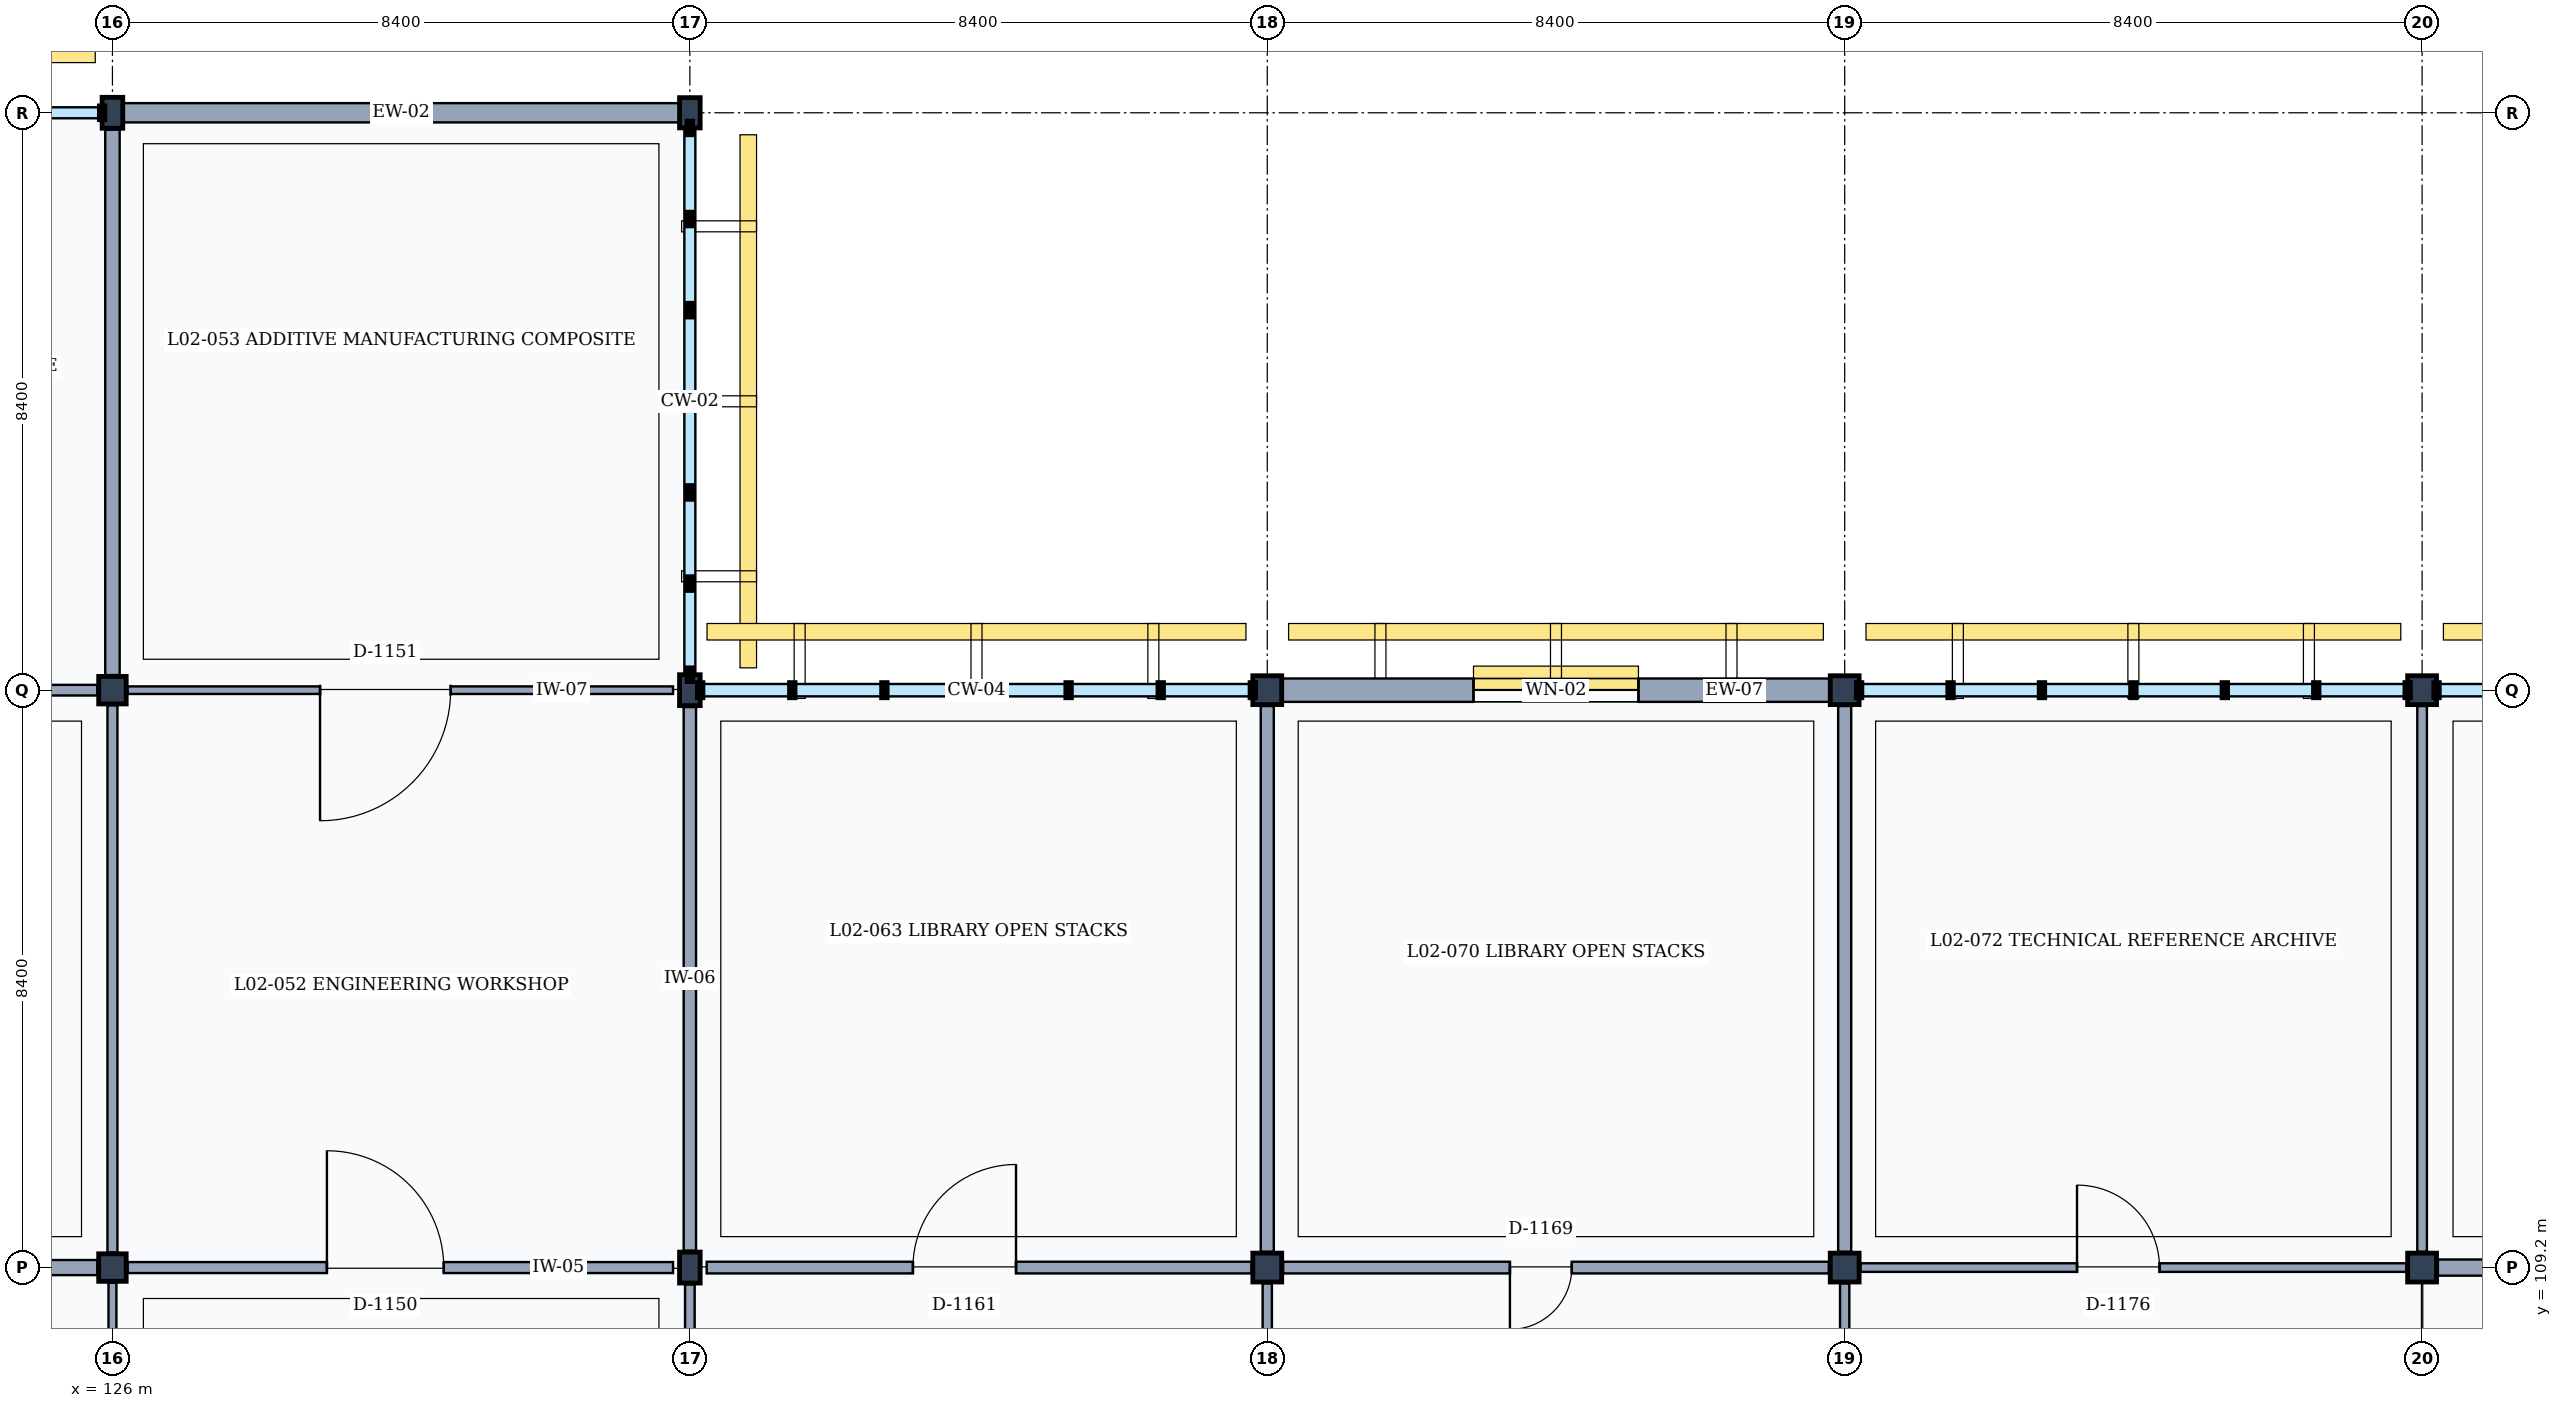
"""IFC4 building model, lengths in metres.
Left out: names, types, materials, properties, quantities, classifications, styles, units other than length and angle.
Written with IfcOpenShell. Run it as: python <this file> out.ifc"""

import sys

from ifc_helpers import new_model, si_unit, direction, frame, frame_2d, origin, origin_2d, place, context, subcontext, project, spatial, rectangle, i_section, extrude, element, fill, save


model = new_model("IFC4")
c1 = context("Model", 3, precision=1e-05, world=origin(), true_north=direction((0.0, 1.0)))
c2 = subcontext(c1, "Body", "Model", "MODEL_VIEW")
j1 = project(units=[si_unit("LENGTHUNIT", "METRE"), si_unit("PLANEANGLEUNIT", "RADIAN")], contexts=[c1])
p1 = place(None, origin())
s1 = spatial("IfcSite", under=j1, at=p1, CompositionType="ELEMENT")
p2 = place(p1, origin())
s2 = spatial("IfcBuilding", under=s1, at=p2, CompositionType="ELEMENT")
p3 = place(p2, frame((0.0, 0.0, 9.6)))
s3 = spatial("IfcBuildingStorey", under=s2, at=p3, CompositionType="ELEMENT", Elevation=9.6)
for number, where, z_axis, x_axis in (
    (1, (126.0, 109.2, 0.0), (0.0, 0.0, 1.0), (1.0, 0.0, 0.0)),
    (2, (126.0, 117.6, 0.0), (0.0, 0.0, 1.0), (1.0, 0.0, 0.0)),
):
    element("IfcColumn", number, at=place(p3, frame(where, z_axis=z_axis, x_axis=x_axis)), inside=s3, PredefinedType="COLUMN", context=c2, shape_type="SweptSolid", body=[
        extrude(rectangle(XDim=0.4, YDim=0.4, at=origin_2d()), origin(), (0.0, 0.0, 1.0), 4.2),
    ])
for number, where, z_axis, x_axis in (
    (3, (126.0, 126.0, 0.0), (0.0, 0.0, 1.0), (1.0, 0.0, 0.0)),
    (4, (134.4, 109.2, 0.0), (0.0, 0.0, 1.0), (1.0, 0.0, 0.0)),
    (5, (134.4, 117.6, 0.0), (0.0, 0.0, 1.0), (1.0, 0.0, 0.0)),
):
    element("IfcColumn", number, at=place(p3, frame(where, z_axis=z_axis, x_axis=x_axis)), inside=s3, PredefinedType="COLUMN", context=c2, shape_type="SweptSolid", body=[
        extrude(i_section(OverallWidth=0.3, OverallDepth=0.45, WebThickness=0.014, FlangeThickness=0.026, FilletRadius=0.027, at=origin_2d()), origin(), (0.0, 0.0, 1.0), 4.2),
    ])
p4 = place(p3, frame((134.4, 126.0, 0.0), z_axis=(0.0, 0.0, 1.0), x_axis=(1.0, 0.0, 0.0)))
e6 = element("IfcColumn", 6, at=p4, inside=s3, PredefinedType="COLUMN", context=c2, shape_type="SweptSolid", body=[
    extrude(i_section(OverallWidth=0.3, OverallDepth=0.44, WebThickness=0.011, FlangeThickness=0.021, FilletRadius=0.027, at=origin_2d()), origin(), (0.0, 0.0, 1.0), 4.2),
])
for number, where, z_axis, x_axis in (
    (7, (142.8, 109.2, 0.0), (0.0, 0.0, 1.0), (1.0, 0.0, 0.0)),
    (8, (142.8, 117.6, 0.0), (0.0, 0.0, 1.0), (1.0, 0.0, 0.0)),
    (9, (151.2, 109.2, 0.0), (0.0, 0.0, 1.0), (1.0, 0.0, 0.0)),
    (10, (151.2, 117.6, 0.0), (0.0, 0.0, 1.0), (1.0, 0.0, 0.0)),
    (11, (159.6, 109.2, 0.0), (0.0, 0.0, 1.0), (1.0, 0.0, 0.0)),
    (12, (159.6, 117.6, 0.0), (0.0, 0.0, 1.0), (1.0, 0.0, 0.0)),
):
    element("IfcColumn", number, at=place(p3, frame(where, z_axis=z_axis, x_axis=x_axis)), inside=s3, PredefinedType="COLUMN", context=c2, shape_type="SweptSolid", body=[
        extrude(rectangle(XDim=0.42, YDim=0.42, at=origin_2d()), origin(), (0.0, 0.0, 1.0), 4.2),
    ])
p5 = place(p3, frame((126.15, 126.0, 0.0), z_axis=(0.0, 0.0, 1.0), x_axis=(1.0, 0.0, 0.0)))
e13 = element("IfcWall", 13, at=p5, inside=s3, PredefinedType="SOLIDWALL", context=c2, shape_type="SweptSolid", body=[
    extrude(rectangle(XDim=8.1, YDim=0.28, at=frame_2d((4.05, 0.0))), origin(), (0.0, 0.0, 1.0), 3.36),
])
p6 = place(p3, frame((143.01, 117.6, 0.0), z_axis=(0.0, 0.0, 1.0), x_axis=(1.0, 0.0, 0.0)))
e14 = element("IfcWall", 14, at=p6, inside=s3, PredefinedType="SOLIDWALL", context=c2, shape_type="SweptSolid", body=[
    extrude(rectangle(XDim=7.98, YDim=0.34, at=frame_2d((3.99, 0.0))), origin(), (0.0, 0.0, 1.0), 3.36),
])
p7 = place(p6, frame((2.79, 0.0, 0.9)))
e15 = element("IfcOpeningElement", 15, at=p7, cuts=e14, PredefinedType="OPENING", context=c2, shape_type="SweptSolid", body=[
    extrude(rectangle(XDim=2.4, YDim=1.8, at=frame_2d((1.2, 0.9))), frame((0.0, 0.18, 0.0), z_axis=(0.0, -1.0, 0.0), x_axis=(1.0, 0.0, 0.0)), (0.0, 0.0, 1.0), 0.36),
])
p8 = place(p3, frame((126.0, 101.02, 0.0), z_axis=(0.0, 0.0, 1.0), x_axis=(0.0, 1.0, 0.0)))
e16 = element("IfcWall", 16, at=p8, inside=s3, PredefinedType="PARTITIONING", context=c2, shape_type="SweptSolid", body=[
    extrude(rectangle(XDim=7.96, YDim=0.115, at=frame_2d((3.98, 0.0))), origin(), (0.0, 0.0, 1.0), 3.32),
])
p9 = place(p3, frame((117.745, 109.2, 0.0), z_axis=(0.0, 0.0, 1.0), x_axis=(1.0, 0.0, 0.0)))
e17 = element("IfcWall", 17, at=p9, inside=s3, PredefinedType="PARTITIONING", context=c2, shape_type="SweptSolid", body=[
    extrude(rectangle(XDim=8.035, YDim=0.22, at=frame_2d((4.018, 0.0))), origin(), (0.0, 0.0, 1.0), 3.32),
])
p10 = place(p9, frame((3.225, 0.0, 0.0)))
e18 = element("IfcOpeningElement", 18, at=p10, cuts=e17, PredefinedType="OPENING", context=c2, shape_type="SweptSolid", body=[
    extrude(rectangle(XDim=1.05, YDim=2.2, at=frame_2d((0.525, 1.1))), frame((0.0, 0.12, 0.0), z_axis=(0.0, -1.0, 0.0), x_axis=(1.0, 0.0, 0.0)), (0.0, 0.0, 1.0), 0.24),
])
p11 = place(p3, frame((126.0, 109.42, 0.0), z_axis=(0.0, 0.0, 1.0), x_axis=(0.0, 1.0, 0.0)))
e19 = element("IfcWall", 19, at=p11, inside=s3, PredefinedType="PARTITIONING", context=c2, shape_type="SweptSolid", body=[
    extrude(rectangle(XDim=7.96, YDim=0.145, at=frame_2d((3.98, 0.0))), origin(), (0.0, 0.0, 1.0), 3.32),
])
p12 = place(p3, frame((117.8, 117.6, 0.0), z_axis=(0.0, 0.0, 1.0), x_axis=(1.0, 0.0, 0.0)))
e20 = element("IfcWall", 20, at=p12, inside=s3, PredefinedType="PARTITIONING", context=c2, shape_type="SweptSolid", body=[
    extrude(rectangle(XDim=7.98, YDim=0.155, at=frame_2d((3.99, 0.0))), origin(), (0.0, 0.0, 1.0), 3.32),
])
p13 = place(p12, frame((3.175, 0.0, 0.0)))
e21 = element("IfcOpeningElement", 21, at=p13, cuts=e20, PredefinedType="OPENING", context=c2, shape_type="SweptSolid", body=[
    extrude(rectangle(XDim=1.15, YDim=2.25, at=frame_2d((0.575, 1.125))), frame((0.0, 0.087, 0.0), z_axis=(0.0, -1.0, 0.0), x_axis=(1.0, 0.0, 0.0)), (0.0, 0.0, 1.0), 0.175),
])
p14 = place(p3, frame((126.0, 117.82, 0.0), z_axis=(0.0, 0.0, 1.0), x_axis=(0.0, 1.0, 0.0)))
e22 = element("IfcWall", 22, at=p14, inside=s3, PredefinedType="PARTITIONING", context=c2, shape_type="SweptSolid", body=[
    extrude(rectangle(XDim=7.935, YDim=0.21, at=frame_2d((3.967, 0.0))), origin(), (0.0, 0.0, 1.0), 3.32),
])
p15 = place(p3, frame((134.4, 101.045, 0.0), z_axis=(0.0, 0.0, 1.0), x_axis=(0.0, 1.0, 0.0)))
e23 = element("IfcWall", 23, at=p15, inside=s3, PredefinedType="PARTITIONING", context=c2, shape_type="SweptSolid", body=[
    extrude(rectangle(XDim=7.91, YDim=0.14, at=frame_2d((3.955, 0.0))), origin(), (0.0, 0.0, 1.0), 3.32),
])
p16 = place(p3, frame((126.22, 109.2, 0.0), z_axis=(0.0, 0.0, 1.0), x_axis=(1.0, 0.0, 0.0)))
e24 = element("IfcWall", 24, at=p16, inside=s3, PredefinedType="PARTITIONING", context=c2, shape_type="SweptSolid", body=[
    extrude(rectangle(XDim=7.935, YDim=0.16, at=frame_2d((3.968, 0.0))), origin(), (0.0, 0.0, 1.0), 3.32),
])
p17 = place(p16, frame((2.9, 0.0, 0.0)))
e25 = element("IfcOpeningElement", 25, at=p17, cuts=e24, PredefinedType="OPENING", context=c2, shape_type="SweptSolid", body=[
    extrude(rectangle(XDim=1.7, YDim=2.3, at=frame_2d((0.85, 1.15))), frame((0.0, 0.09, 0.0), z_axis=(0.0, -1.0, 0.0), x_axis=(1.0, 0.0, 0.0)), (0.0, 0.0, 1.0), 0.18),
])
p18 = place(p3, frame((134.4, 109.445, 0.0), z_axis=(0.0, 0.0, 1.0), x_axis=(0.0, 1.0, 0.0)))
e26 = element("IfcWall", 26, at=p18, inside=s3, PredefinedType="PARTITIONING", context=c2, shape_type="SweptSolid", body=[
    extrude(rectangle(XDim=7.91, YDim=0.18, at=frame_2d((3.955, 0.0))), origin(), (0.0, 0.0, 1.0), 3.32),
])
p19 = place(p3, frame((126.22, 117.6, 0.0), z_axis=(0.0, 0.0, 1.0), x_axis=(1.0, 0.0, 0.0)))
e27 = element("IfcWall", 27, at=p19, inside=s3, PredefinedType="PARTITIONING", context=c2, shape_type="SweptSolid", body=[
    extrude(rectangle(XDim=7.935, YDim=0.11, at=frame_2d((3.968, 0.0))), origin(), (0.0, 0.0, 1.0), 3.32),
])
p20 = place(p19, frame((2.8, 0.0, 0.0)))
e28 = element("IfcOpeningElement", 28, at=p20, cuts=e27, PredefinedType="OPENING", context=c2, shape_type="SweptSolid", body=[
    extrude(rectangle(XDim=1.9, YDim=2.4, at=frame_2d((0.95, 1.2))), frame((0.0, 0.065, 0.0), z_axis=(0.0, -1.0, 0.0), x_axis=(1.0, 0.0, 0.0)), (0.0, 0.0, 1.0), 0.13),
])
p21 = place(p3, frame((142.8, 101.03, 0.0), z_axis=(0.0, 0.0, 1.0), x_axis=(0.0, 1.0, 0.0)))
e29 = element("IfcWall", 29, at=p21, inside=s3, PredefinedType="PARTITIONING", context=c2, shape_type="SweptSolid", body=[
    extrude(rectangle(XDim=7.94, YDim=0.135, at=frame_2d((3.97, 0.0))), origin(), (0.0, 0.0, 1.0), 3.32),
])
p22 = place(p3, frame((134.645, 109.2, 0.0), z_axis=(0.0, 0.0, 1.0), x_axis=(1.0, 0.0, 0.0)))
e30 = element("IfcWall", 30, at=p22, inside=s3, PredefinedType="PARTITIONING", context=c2, shape_type="SweptSolid", body=[
    extrude(rectangle(XDim=7.925, YDim=0.17, at=frame_2d((3.962, 0.0))), origin(), (0.0, 0.0, 1.0), 3.32),
])
p23 = place(p22, frame((3.0, 0.0, 0.0)))
e31 = element("IfcOpeningElement", 31, at=p23, cuts=e30, PredefinedType="OPENING", context=c2, shape_type="SweptSolid", body=[
    extrude(rectangle(XDim=1.5, YDim=2.3, at=frame_2d((0.75, 1.15))), frame((0.0, 0.095, 0.0), z_axis=(0.0, -1.0, 0.0), x_axis=(1.0, 0.0, 0.0)), (0.0, 0.0, 1.0), 0.19),
])
p24 = place(p3, frame((142.8, 109.43, 0.0), z_axis=(0.0, 0.0, 1.0), x_axis=(0.0, 1.0, 0.0)))
e32 = element("IfcWall", 32, at=p24, inside=s3, PredefinedType="PARTITIONING", context=c2, shape_type="SweptSolid", body=[
    extrude(rectangle(XDim=7.94, YDim=0.19, at=frame_2d((3.97, 0.0))), origin(), (0.0, 0.0, 1.0), 3.32),
])
p25 = place(p3, frame((151.2, 101.03, 0.0), z_axis=(0.0, 0.0, 1.0), x_axis=(0.0, 1.0, 0.0)))
e33 = element("IfcWall", 33, at=p25, inside=s3, PredefinedType="PARTITIONING", context=c2, shape_type="SweptSolid", body=[
    extrude(rectangle(XDim=7.94, YDim=0.135, at=frame_2d((3.97, 0.0))), origin(), (0.0, 0.0, 1.0), 3.32),
])
p26 = place(p25, frame((2.8, 0.0, 0.0)))
e34 = element("IfcOpeningElement", 34, at=p26, cuts=e33, PredefinedType="OPENING", context=c2, shape_type="SweptSolid", body=[
    extrude(rectangle(XDim=1.9, YDim=2.4, at=frame_2d((0.95, 1.2))), frame((0.0, 0.077, 0.0), z_axis=(0.0, -1.0, 0.0), x_axis=(1.0, 0.0, 0.0)), (0.0, 0.0, 1.0), 0.155),
])
p27 = place(p3, frame((143.03, 109.2, 0.0), z_axis=(0.0, 0.0, 1.0), x_axis=(1.0, 0.0, 0.0)))
e35 = element("IfcWall", 35, at=p27, inside=s3, PredefinedType="PARTITIONING", context=c2, shape_type="SweptSolid", body=[
    extrude(rectangle(XDim=7.94, YDim=0.17, at=frame_2d((3.97, 0.0))), origin(), (0.0, 0.0, 1.0), 3.21),
])
p28 = place(p27, frame((3.3, 0.0, 0.0)))
e36 = element("IfcOpeningElement", 36, at=p28, cuts=e35, PredefinedType="OPENING", context=c2, shape_type="SweptSolid", body=[
    extrude(rectangle(XDim=0.9, YDim=2.1, at=frame_2d((0.45, 1.05))), frame((0.0, 0.095, 0.0), z_axis=(0.0, -1.0, 0.0), x_axis=(1.0, 0.0, 0.0)), (0.0, 0.0, 1.0), 0.19),
])
p29 = place(p3, frame((151.2, 109.43, 0.0), z_axis=(0.0, 0.0, 1.0), x_axis=(0.0, 1.0, 0.0)))
e37 = element("IfcWall", 37, at=p29, inside=s3, PredefinedType="PARTITIONING", context=c2, shape_type="SweptSolid", body=[
    extrude(rectangle(XDim=7.94, YDim=0.19, at=frame_2d((3.97, 0.0))), origin(), (0.0, 0.0, 1.0), 3.32),
])
p30 = place(p3, frame((151.43, 109.2, 0.0), z_axis=(0.0, 0.0, 1.0), x_axis=(1.0, 0.0, 0.0)))
e38 = element("IfcWall", 38, at=p30, inside=s3, PredefinedType="PARTITIONING", context=c2, shape_type="SweptSolid", body=[
    extrude(rectangle(XDim=7.94, YDim=0.125, at=frame_2d((3.97, 0.0))), origin(), (0.0, 0.0, 1.0), 3.24),
])
p31 = place(p30, frame((3.15, 0.0, 0.0)))
e39 = element("IfcOpeningElement", 39, at=p31, cuts=e38, PredefinedType="OPENING", context=c2, shape_type="SweptSolid", body=[
    extrude(rectangle(XDim=1.2, YDim=2.2, at=frame_2d((0.6, 1.1))), frame((0.0, 0.073, 0.0), z_axis=(0.0, -1.0, 0.0), x_axis=(1.0, 0.0, 0.0)), (0.0, 0.0, 1.0), 0.145),
])
p32 = place(p3, frame((159.6, 109.43, 0.0), z_axis=(0.0, 0.0, 1.0), x_axis=(0.0, 1.0, 0.0)))
e40 = element("IfcWall", 40, at=p32, inside=s3, PredefinedType="PARTITIONING", context=c2, shape_type="SweptSolid", body=[
    extrude(rectangle(XDim=7.94, YDim=0.14, at=frame_2d((3.97, 0.0))), origin(), (0.0, 0.0, 1.0), 3.32),
])
p33 = place(p3, frame((159.83, 109.2, 0.0), z_axis=(0.0, 0.0, 1.0), x_axis=(1.0, 0.0, 0.0)))
e41 = element("IfcWall", 41, at=p33, inside=s3, PredefinedType="PARTITIONING", context=c2, shape_type="SweptSolid", body=[
    extrude(rectangle(XDim=7.94, YDim=0.235, at=frame_2d((3.97, 0.0))), origin(), (0.0, 0.0, 1.0), 3.24),
])
p34 = place(p33, frame((2.9, 0.0, 0.0)))
e42 = element("IfcOpeningElement", 42, at=p34, cuts=e41, PredefinedType="OPENING", context=c2, shape_type="SweptSolid", body=[
    extrude(rectangle(XDim=1.7, YDim=2.3, at=frame_2d((0.85, 1.15))), frame((0.0, 0.127, 0.0), z_axis=(0.0, -1.0, 0.0), x_axis=(1.0, 0.0, 0.0)), (0.0, 0.0, 1.0), 0.255),
])
p35 = place(p7, origin())
e43 = element("IfcWindow", 43, at=p35, inside=s3, PartitioningType="SINGLE_PANEL", PredefinedType="WINDOW", context=c2, shape_type="SweptSolid", body=[
    extrude(rectangle(XDim=2.4, YDim=1.8, at=frame_2d((1.2, 0.9))), frame((0.0, 0.03, 0.0), z_axis=(0.0, -1.0, 0.0), x_axis=(1.0, 0.0, 0.0)), (0.0, 0.0, 1.0), 0.06),
])
fill(e15, e43)
p36 = place(p17, origin())
e44 = element("IfcDoor", 44, at=p36, inside=s3, OperationType="SINGLE_SWING_LEFT", PredefinedType="DOOR", context=c2, shape_type="SweptSolid", body=[
    extrude(rectangle(XDim=1.7, YDim=2.3, at=frame_2d((0.85, 1.15))), frame((0.0, 0.025, 0.0), z_axis=(0.0, -1.0, 0.0), x_axis=(1.0, 0.0, 0.0)), (0.0, 0.0, 1.0), 0.05),
])
fill(e25, e44)
p37 = place(p20, frame((1.9, 0.0, 0.0), z_axis=(0.0, 0.0, 1.0), x_axis=(-1.0, 0.0, 0.0)))
e45 = element("IfcDoor", 45, at=p37, inside=s3, OperationType="SINGLE_SWING_RIGHT", PredefinedType="DOOR", context=c2, shape_type="SweptSolid", body=[
    extrude(rectangle(XDim=1.9, YDim=2.4, at=frame_2d((0.95, 1.2))), frame((0.0, 0.025, 0.0), z_axis=(0.0, -1.0, 0.0), x_axis=(1.0, 0.0, 0.0)), (0.0, 0.0, 1.0), 0.05),
])
fill(e28, e45)
p38 = place(p23, origin())
e46 = element("IfcDoor", 46, at=p38, inside=s3, OperationType="SINGLE_SWING_RIGHT", PredefinedType="DOOR", context=c2, shape_type="SweptSolid", body=[
    extrude(rectangle(XDim=1.5, YDim=2.3, at=frame_2d((0.75, 1.15))), frame((0.0, 0.025, 0.0), z_axis=(0.0, -1.0, 0.0), x_axis=(1.0, 0.0, 0.0)), (0.0, 0.0, 1.0), 0.05),
])
fill(e31, e46)
p39 = place(p28, frame((0.9, 0.0, 0.0), z_axis=(0.0, 0.0, 1.0), x_axis=(-1.0, 0.0, 0.0)))
e47 = element("IfcDoor", 47, at=p39, inside=s3, OperationType="SINGLE_SWING_RIGHT", PredefinedType="DOOR", context=c2, shape_type="SweptSolid", body=[
    extrude(rectangle(XDim=0.9, YDim=2.1, at=frame_2d((0.45, 1.05))), frame((0.0, 0.025, 0.0), z_axis=(0.0, -1.0, 0.0), x_axis=(1.0, 0.0, 0.0)), (0.0, 0.0, 1.0), 0.05),
])
fill(e36, e47)
p40 = place(p31, origin())
e48 = element("IfcDoor", 48, at=p40, inside=s3, OperationType="SINGLE_SWING_LEFT", PredefinedType="DOOR", context=c2, shape_type="SweptSolid", body=[
    extrude(rectangle(XDim=1.2, YDim=2.2, at=frame_2d((0.6, 1.1))), frame((0.0, 0.025, 0.0), z_axis=(0.0, -1.0, 0.0), x_axis=(1.0, 0.0, 0.0)), (0.0, 0.0, 1.0), 0.05),
])
fill(e39, e48)
save(model, sys.argv[1])
